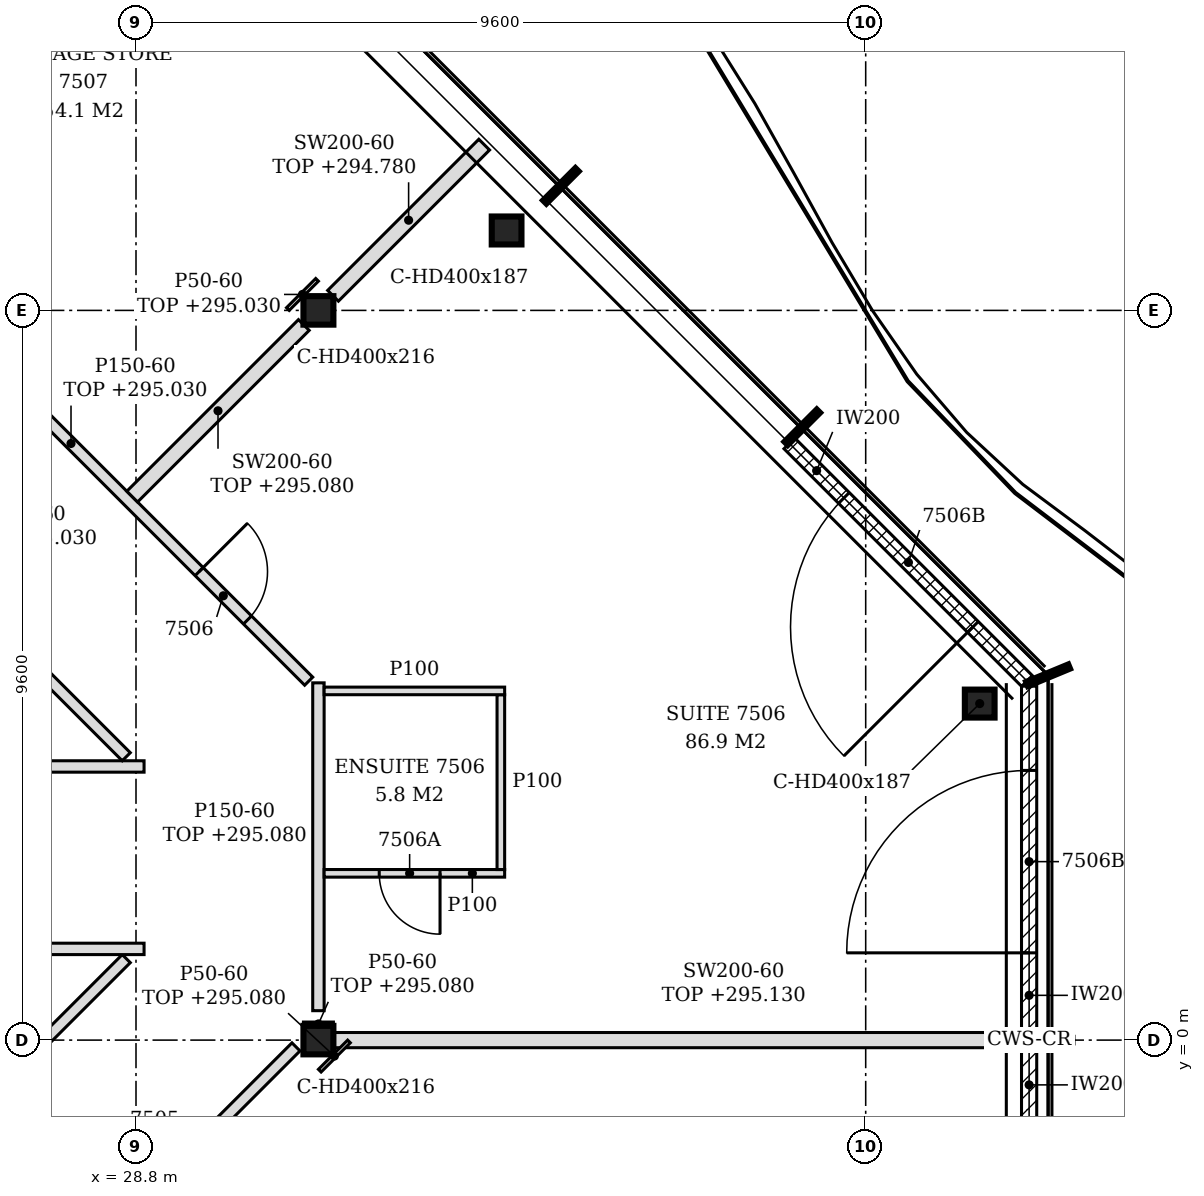
"""IFC4 building model, lengths in metres.
Left out: names, types, materials, properties, quantities, classifications, styles, units other than length and angle.
Written with IfcOpenShell. Run it as: python <this file> out.ifc"""

import sys

from ifc_helpers import new_model, si_unit, direction, frame, frame_2d, origin, origin_2d, place, context, subcontext, project, spatial, polyline, rectangle, i_section, outline, extrude, element, fill, save


model = new_model("IFC4")
c1 = context("Model", 3, precision=1e-05, world=origin(), true_north=direction((0.0, 1.0)))
c2 = subcontext(c1, "Body", "Model", "MODEL_VIEW")
j1 = project(units=[si_unit("LENGTHUNIT", "METRE"), si_unit("PLANEANGLEUNIT", "RADIAN")], contexts=[c1])
p1 = place(None, origin())
s1 = spatial("IfcSite", under=j1, at=p1, CompositionType="ELEMENT")
p2 = place(p1, origin())
s2 = spatial("IfcBuilding", under=s1, at=p2, CompositionType="ELEMENT")
p3 = place(p2, frame((0.0, 0.0, 292.2)))
s3 = spatial("IfcBuildingStorey", under=s2, at=p3, CompositionType="ELEMENT", Elevation=292.2)
for number, where, z_axis, x_axis in (
    (1, (39.9, 4.427, -0.15), (0.0, 0.0, 1.0), (1.0, 0.0, 0.0)),
    (2, (33.676, 10.652, -0.15), (0.0, 0.0, 1.0), (1.0, 0.0, 0.0)),
):
    element("IfcColumn", number, at=place(p3, frame(where, z_axis=z_axis, x_axis=x_axis)), inside=s3, PredefinedType="COLUMN", context=c2, shape_type="SweptSolid", body=[
        extrude(i_section(OverallWidth=0.391, OverallDepth=0.368, WebThickness=0.015, FlangeThickness=0.024, FilletRadius=0.015, at=origin_2d()), origin(), (0.0, 0.0, 1.0), 3.55),
    ])
for number, where, z_axis, x_axis in (
    (3, (31.2, 0.0, -0.15), (0.0, 0.0, 1.0), (1.0, 0.0, 0.0)),
    (4, (31.2, 9.6, -0.15), (0.0, 0.0, 1.0), (1.0, 0.0, 0.0)),
):
    element("IfcColumn", number, at=place(p3, frame(where, z_axis=z_axis, x_axis=x_axis)), inside=s3, PredefinedType="COLUMN", context=c2, shape_type="SweptSolid", body=[
        extrude(i_section(OverallWidth=0.394, OverallDepth=0.375, WebThickness=0.017, FlangeThickness=0.028, FilletRadius=0.015, at=origin_2d()), origin(), (0.0, 0.0, 1.0), 3.55),
    ])
p4 = place(p3, frame((40.55, -4.656, 0.0), z_axis=(0.0, 0.0, 1.0), x_axis=(0.0, 1.0, 0.0)))
e5 = element("IfcWall", 5, at=p4, inside=s3, PredefinedType="NOTDEFINED", context=c2, shape_type="SweptSolid", body=[
    extrude(rectangle(XDim=4.626, YDim=0.2, at=frame_2d((2.313, 0.0))), origin(), (0.0, 0.0, 1.0), 3.4),
])
p5 = place(p4, frame((1.108, 0.0, 0.0)))
e6 = element("IfcOpeningElement", 6, at=p5, cuts=e5, PredefinedType="OPENING", context=c2, shape_type="SweptSolid", body=[
    extrude(rectangle(XDim=2.4, YDim=2.4, at=frame_2d((1.2, 1.2))), frame((0.0, 0.11, 0.0), z_axis=(0.0, -1.0, 0.0), x_axis=(1.0, 0.0, 0.0)), (0.0, 0.0, 1.0), 0.22),
])
p6 = place(p3, frame((40.55, 0.03, 0.0), z_axis=(0.0, 0.0, 1.0), x_axis=(0.0, 1.0, 0.0)))
e7 = element("IfcWall", 7, at=p6, inside=s3, PredefinedType="NOTDEFINED", context=c2, shape_type="SweptSolid", body=[
    extrude(rectangle(XDim=4.626, YDim=0.2, at=frame_2d((2.313, 0.0))), origin(), (0.0, 0.0, 1.0), 3.4),
])
p7 = place(p6, frame((1.118, 0.0, 0.0)))
e8 = element("IfcOpeningElement", 8, at=p7, cuts=e7, PredefinedType="OPENING", context=c2, shape_type="SweptSolid", body=[
    extrude(rectangle(XDim=2.4, YDim=2.4, at=frame_2d((1.2, 1.2))), frame((0.0, 0.11, 0.0), z_axis=(0.0, -1.0, 0.0), x_axis=(1.0, 0.0, 0.0)), (0.0, 0.0, 1.0), 0.22),
])
p8 = place(p3, frame((40.522, 4.725, 0.0), z_axis=(0.0, 0.0, 1.0), x_axis=(-0.707106781187, 0.707106781187, 0.0)))
e9 = element("IfcWall", 9, at=p8, inside=s3, PredefinedType="NOTDEFINED", context=c2, shape_type="SweptSolid", body=[
    extrude(rectangle(XDim=4.421, YDim=0.2, at=frame_2d((2.21, 0.0))), origin(), (0.0, 0.0, 1.0), 3.4),
])
p9 = place(p8, frame((1.005, 0.0, 0.0)))
e10 = element("IfcOpeningElement", 10, at=p9, cuts=e9, PredefinedType="OPENING", context=c2, shape_type="SweptSolid", body=[
    extrude(rectangle(XDim=2.4, YDim=2.4, at=frame_2d((1.2, 1.2))), frame((0.0, 0.11, 0.0), z_axis=(0.0, -1.0, 0.0), x_axis=(1.0, 0.0, 0.0)), (0.0, 0.0, 1.0), 0.22),
])
p10 = place(p3, frame((16.722, -14.272, 0.0), z_axis=(0.0, 0.0, 1.0), x_axis=(0.707106781187, 0.707106781187, 0.0)))
e11 = element("IfcWall", 11, at=p10, inside=s3, PredefinedType="PARTITIONING", context=c2, shape_type="SweptSolid", body=[
    extrude(rectangle(XDim=20.058, YDim=0.15, at=frame_2d((10.029, 0.0))), origin(), (0.0, 0.0, 1.0), 2.68),
])
p11 = place(p10, frame((3.195, 0.0, 0.0)))
e12 = element("IfcOpeningElement", 12, at=p11, cuts=e11, PredefinedType="OPENING", context=c2, shape_type="SweptSolid", body=[
    extrude(rectangle(XDim=0.9, YDim=2.1, at=frame_2d((0.45, 1.05))), frame((0.0, 0.085, 0.0), z_axis=(0.0, -1.0, 0.0), x_axis=(1.0, 0.0, 0.0)), (0.0, 0.0, 1.0), 0.17),
])
p12 = place(p10, frame((9.193, 0.0, 0.0)))
e13 = element("IfcOpeningElement", 13, at=p12, cuts=e11, PredefinedType="OPENING", context=c2, shape_type="SweptSolid", body=[
    extrude(rectangle(XDim=0.9, YDim=2.1, at=frame_2d((0.45, 1.05))), frame((0.0, 0.085, 0.0), z_axis=(0.0, -1.0, 0.0), x_axis=(1.0, 0.0, 0.0)), (0.0, 0.0, 1.0), 0.17),
])
p13 = place(p10, frame((17.613, 0.0, 0.0)))
e14 = element("IfcOpeningElement", 14, at=p13, cuts=e11, PredefinedType="OPENING", context=c2, shape_type="SweptSolid", body=[
    extrude(rectangle(XDim=0.9, YDim=2.1, at=frame_2d((0.45, 1.05))), frame((0.0, 0.085, 0.0), z_axis=(0.0, -1.0, 0.0), x_axis=(1.0, 0.0, 0.0)), (0.0, 0.0, 1.0), 0.17),
])
p14 = place(p3, frame((19.392, -8.208, 0.0), z_axis=(0.0, 0.0, 1.0), x_axis=(0.707106781187, 0.707106781187, 0.0)))
e15 = element("IfcWall", 15, at=p14, inside=s3, PredefinedType="PARTITIONING", context=c2, shape_type="SweptSolid", body=[
    extrude(rectangle(XDim=13.124, YDim=0.15, at=frame_2d((6.562, 0.0))), origin(), (0.0, 0.0, 1.0), 2.83),
])
p15 = place(p14, frame((6.066, 0.0, 0.0)))
e16 = element("IfcOpeningElement", 16, at=p15, cuts=e15, PredefinedType="OPENING", context=c2, shape_type="SweptSolid", body=[
    extrude(rectangle(XDim=0.9, YDim=2.1, at=frame_2d((0.45, 1.05))), frame((0.0, 0.085, 0.0), z_axis=(0.0, -1.0, 0.0), x_axis=(1.0, 0.0, 0.0)), (0.0, 0.0, 1.0), 0.17),
])
p16 = place(p3, frame((31.397, 0.0, 0.0), z_axis=(0.0, 0.0, 1.0), x_axis=(1.0, 0.0, 0.0)))
e17 = element("IfcWall", 17, at=p16, inside=s3, PredefinedType="PARTITIONING", context=c2, shape_type="SweptSolid", body=[
    extrude(outline(polyline([(0.0, 0.0), (9.053, 0.0), (9.053, 2.93), (8.653, 2.93), (8.651, 2.88), (8.353, 2.88), (8.351, 2.93), (0.0, 2.93), (0.0, 0.0)])), frame((0.0, 0.1, 0.0), z_axis=(0.0, -1.0, 0.0), x_axis=(1.0, 0.0, 0.0)), (0.0, 0.0, 1.0), 0.2),
])
p17 = place(p3, frame((31.2, 0.387, 0.0), z_axis=(0.0, 0.0, 1.0), x_axis=(0.0, 1.0, 0.0)))
e18 = element("IfcWall", 18, at=p17, inside=s3, PredefinedType="PARTITIONING", context=c2, shape_type="SweptSolid", body=[
    extrude(rectangle(XDim=4.313, YDim=0.15, at=frame_2d((2.156, 0.0))), origin(), (0.0, 0.0, 1.0), 2.88),
])
p18 = place(p3, frame((19.125, 1.2, 0.0), z_axis=(0.0, 0.0, 1.0), x_axis=(1.0, 0.0, 0.0)))
e19 = element("IfcWall", 19, at=p18, inside=s3, PredefinedType="PARTITIONING", context=c2, shape_type="SweptSolid", body=[
    extrude(outline(polyline([(0.0, 0.0), (9.781, 0.0), (9.781, 3.4), (0.225, 3.4), (0.223, 2.78), (0.0, 2.78), (0.0, 0.0)])), frame((0.0, 0.075, 0.0), z_axis=(0.0, -1.0, 0.0), x_axis=(1.0, 0.0, 0.0)), (0.0, 0.0, 1.0), 0.15),
])
p19 = place(p3, frame((31.275, 2.194, 0.0), z_axis=(0.0, 0.0, 1.0), x_axis=(1.0, 0.0, 0.0)))
e20 = element("IfcWall", 20, at=p19, inside=s3, PredefinedType="PARTITIONING", context=c2, shape_type="SweptSolid", body=[
    extrude(outline(polyline([(0.0, 0.0), (2.375, 0.0), (2.375, 3.4), (0.075, 3.4), (0.073, 2.88), (0.0, 2.88), (0.0, 0.0)])), frame((0.0, 0.05, 0.0), z_axis=(0.0, -1.0, 0.0), x_axis=(1.0, 0.0, 0.0)), (0.0, 0.0, 1.0), 0.1),
])
p20 = place(p19, frame((0.725, 0.0, 0.0)))
e21 = element("IfcOpeningElement", 21, at=p20, cuts=e20, PredefinedType="OPENING", context=c2, shape_type="SweptSolid", body=[
    extrude(rectangle(XDim=0.8, YDim=2.1, at=frame_2d((0.4, 1.05))), frame((0.0, 0.06, 0.0), z_axis=(0.0, -1.0, 0.0), x_axis=(1.0, 0.0, 0.0)), (0.0, 0.0, 1.0), 0.12),
])
p21 = place(p3, frame((33.6, 2.244, 0.0), z_axis=(0.0, 0.0, 1.0), x_axis=(0.0, 1.0, 0.0)))
e22 = element("IfcWall", 22, at=p21, inside=s3, PredefinedType="PARTITIONING", context=c2, shape_type="SweptSolid", body=[
    extrude(rectangle(XDim=2.3, YDim=0.1, at=frame_2d((1.15, 0.0))), origin(), (0.0, 0.0, 1.0), 3.4),
])
p22 = place(p3, frame((19.125, 3.6, 0.0), z_axis=(0.0, 0.0, 1.0), x_axis=(1.0, 0.0, 0.0)))
e23 = element("IfcWall", 23, at=p22, inside=s3, PredefinedType="PARTITIONING", context=c2, shape_type="SweptSolid", body=[
    extrude(outline(polyline([(0.0, 0.0), (9.781, 0.0), (9.781, 3.4), (0.225, 3.4), (0.223, 2.78), (0.0, 2.78), (0.0, 0.0)])), frame((0.0, 0.075, 0.0), z_axis=(0.0, -1.0, 0.0), x_axis=(1.0, 0.0, 0.0)), (0.0, 0.0, 1.0), 0.15),
])
p23 = place(p3, frame((28.672, 3.728, 0.0), z_axis=(0.0, 0.0, 1.0), x_axis=(-0.707106781187, 0.707106781187, 0.0)))
e24 = element("IfcWall", 24, at=p23, inside=s3, PredefinedType="PARTITIONING", context=c2, shape_type="SweptSolid", body=[
    extrude(rectangle(XDim=13.124, YDim=0.15, at=frame_2d((6.562, 0.0))), origin(), (0.0, 0.0, 1.0), 2.83),
])
p24 = place(p23, frame((6.157, 0.0, 0.0)))
e25 = element("IfcOpeningElement", 25, at=p24, cuts=e24, PredefinedType="OPENING", context=c2, shape_type="SweptSolid", body=[
    extrude(rectangle(XDim=0.9, YDim=2.1, at=frame_2d((0.45, 1.05))), frame((0.0, 0.085, 0.0), z_axis=(0.0, -1.0, 0.0), x_axis=(1.0, 0.0, 0.0)), (0.0, 0.0, 1.0), 0.17),
])
p25 = place(p3, frame((31.275, 4.594, 0.0), z_axis=(0.0, 0.0, 1.0), x_axis=(1.0, 0.0, 0.0)))
e26 = element("IfcWall", 26, at=p25, inside=s3, PredefinedType="PARTITIONING", context=c2, shape_type="SweptSolid", body=[
    extrude(outline(polyline([(0.0, 0.0), (2.375, 0.0), (2.375, 3.4), (0.075, 3.4), (0.073, 2.88), (0.0, 2.88), (0.0, 0.0)])), frame((0.0, 0.05, 0.0), z_axis=(0.0, -1.0, 0.0), x_axis=(1.0, 0.0, 0.0)), (0.0, 0.0, 1.0), 0.1),
])
p26 = place(p3, frame((31.072, 4.722, 0.0), z_axis=(0.0, 0.0, 1.0), x_axis=(-0.707106781187, 0.707106781187, 0.0)))
e27 = element("IfcWall", 27, at=p26, inside=s3, PredefinedType="PARTITIONING", context=c2, shape_type="SweptSolid", body=[
    extrude(rectangle(XDim=11.99, YDim=0.15, at=frame_2d((5.995, 0.0))), origin(), (0.0, 0.0, 1.0), 2.83),
])
p27 = place(p26, frame((1.139, 0.0, 0.0)))
e28 = element("IfcOpeningElement", 28, at=p27, cuts=e27, PredefinedType="OPENING", context=c2, shape_type="SweptSolid", body=[
    extrude(rectangle(XDim=0.9, YDim=2.1, at=frame_2d((0.45, 1.05))), frame((0.0, 0.085, 0.0), z_axis=(0.0, -1.0, 0.0), x_axis=(1.0, 0.0, 0.0)), (0.0, 0.0, 1.0), 0.17),
])
p28 = place(p26, frame((6.806, 0.0, 0.0)))
e29 = element("IfcOpeningElement", 29, at=p28, cuts=e27, PredefinedType="OPENING", context=c2, shape_type="SweptSolid", body=[
    extrude(rectangle(XDim=0.9, YDim=2.1, at=frame_2d((0.45, 1.05))), frame((0.0, 0.085, 0.0), z_axis=(0.0, -1.0, 0.0), x_axis=(1.0, 0.0, 0.0)), (0.0, 0.0, 1.0), 0.17),
])
p29 = place(p3, frame((28.75, 7.15, 0.0), z_axis=(0.0, 0.0, 1.0), x_axis=(0.707106781187, 0.707106781187, 0.0)))
e30 = element("IfcWall", 30, at=p29, inside=s3, PredefinedType="PARTITIONING", context=c2, shape_type="SweptSolid", body=[
    extrude(rectangle(XDim=3.193, YDim=0.2, at=frame_2d((1.597, 0.0))), origin(), (0.0, 0.0, 1.0), 2.88),
])
p30 = place(p3, frame((31.392, 9.792, 0.0), z_axis=(0.0, 0.0, 1.0), x_axis=(0.707106781187, 0.707106781187, 0.0)))
e31 = element("IfcWall", 31, at=p30, inside=s3, PredefinedType="PARTITIONING", context=c2, shape_type="SweptSolid", body=[
    extrude(rectangle(XDim=2.812, YDim=0.2, at=frame_2d((1.406, 0.0))), origin(), (0.0, 0.0, 1.0), 2.58),
])
p31 = place(p3, frame((31.218, -0.402, 0.0), z_axis=(0.0, 0.0, 1.0), x_axis=(0.707106781187, 0.707106781187, 0.0)))
e32 = element("IfcWall", 32, at=p31, inside=s3, PredefinedType="PARTITIONING", context=c2, shape_type="SweptSolid", body=[
    extrude(rectangle(XDim=0.544, YDim=0.05, at=frame_2d((0.272, 0.0))), origin(), (0.0, 0.0, 1.0), 2.88),
])
p32 = place(p3, frame((31.003, 0.212, 0.0), z_axis=(0.0, 0.0, 1.0), x_axis=(1.0, 0.0, 0.0)))
e33 = element("IfcWall", 33, at=p32, inside=s3, PredefinedType="PARTITIONING", context=c2, shape_type="SweptSolid", body=[
    extrude(rectangle(XDim=0.394, YDim=0.05, at=frame_2d((0.197, 0.0))), origin(), (0.0, 0.0, 1.0), 2.88),
])
p33 = place(p3, frame((30.798, 9.618, 0.0), z_axis=(0.0, 0.0, 1.0), x_axis=(0.707106781187, 0.707106781187, 0.0)))
e34 = element("IfcWall", 34, at=p33, inside=s3, PredefinedType="PARTITIONING", context=c2, shape_type="SweptSolid", body=[
    extrude(rectangle(XDim=0.544, YDim=0.05, at=frame_2d((0.272, 0.0))), origin(), (0.0, 0.0, 1.0), 2.83),
])
p34 = place(p7, origin())
e35 = element("IfcDoor", 35, at=p34, inside=s3, OperationType="SINGLE_SWING_LEFT", PredefinedType="DOOR", context=c2, shape_type="SweptSolid", body=[
    extrude(rectangle(XDim=2.4, YDim=2.4, at=frame_2d((1.2, 1.2))), frame((0.0, 0.025, 0.0), z_axis=(0.0, -1.0, 0.0), x_axis=(1.0, 0.0, 0.0)), (0.0, 0.0, 1.0), 0.05),
])
fill(e8, e35)
p35 = place(p9, origin())
e36 = element("IfcDoor", 36, at=p35, inside=s3, OperationType="SINGLE_SWING_LEFT", PredefinedType="DOOR", context=c2, shape_type="SweptSolid", body=[
    extrude(rectangle(XDim=2.4, YDim=2.4, at=frame_2d((1.2, 1.2))), frame((0.0, 0.025, 0.0), z_axis=(0.0, -1.0, 0.0), x_axis=(1.0, 0.0, 0.0)), (0.0, 0.0, 1.0), 0.05),
])
fill(e10, e36)
p36 = place(p27, frame((0.9, 0.0, 0.0), z_axis=(0.0, 0.0, 1.0), x_axis=(-1.0, 0.0, 0.0)))
e37 = element("IfcDoor", 37, at=p36, inside=s3, OperationType="SINGLE_SWING_LEFT", PredefinedType="DOOR", context=c2, shape_type="SweptSolid", body=[
    extrude(rectangle(XDim=0.9, YDim=2.1, at=frame_2d((0.45, 1.05))), frame((0.0, 0.025, 0.0), z_axis=(0.0, -1.0, 0.0), x_axis=(1.0, 0.0, 0.0)), (0.0, 0.0, 1.0), 0.05),
])
fill(e28, e37)
p37 = place(p20, frame((0.8, 0.0, 0.0), z_axis=(0.0, 0.0, 1.0), x_axis=(-1.0, 0.0, 0.0)))
e38 = element("IfcDoor", 38, at=p37, inside=s3, OperationType="SINGLE_SWING_LEFT", PredefinedType="DOOR", context=c2, shape_type="SweptSolid", body=[
    extrude(rectangle(XDim=0.8, YDim=2.1, at=frame_2d((0.4, 1.05))), frame((0.0, 0.025, 0.0), z_axis=(0.0, -1.0, 0.0), x_axis=(1.0, 0.0, 0.0)), (0.0, 0.0, 1.0), 0.05),
])
fill(e21, e38)
save(model, sys.argv[1])
